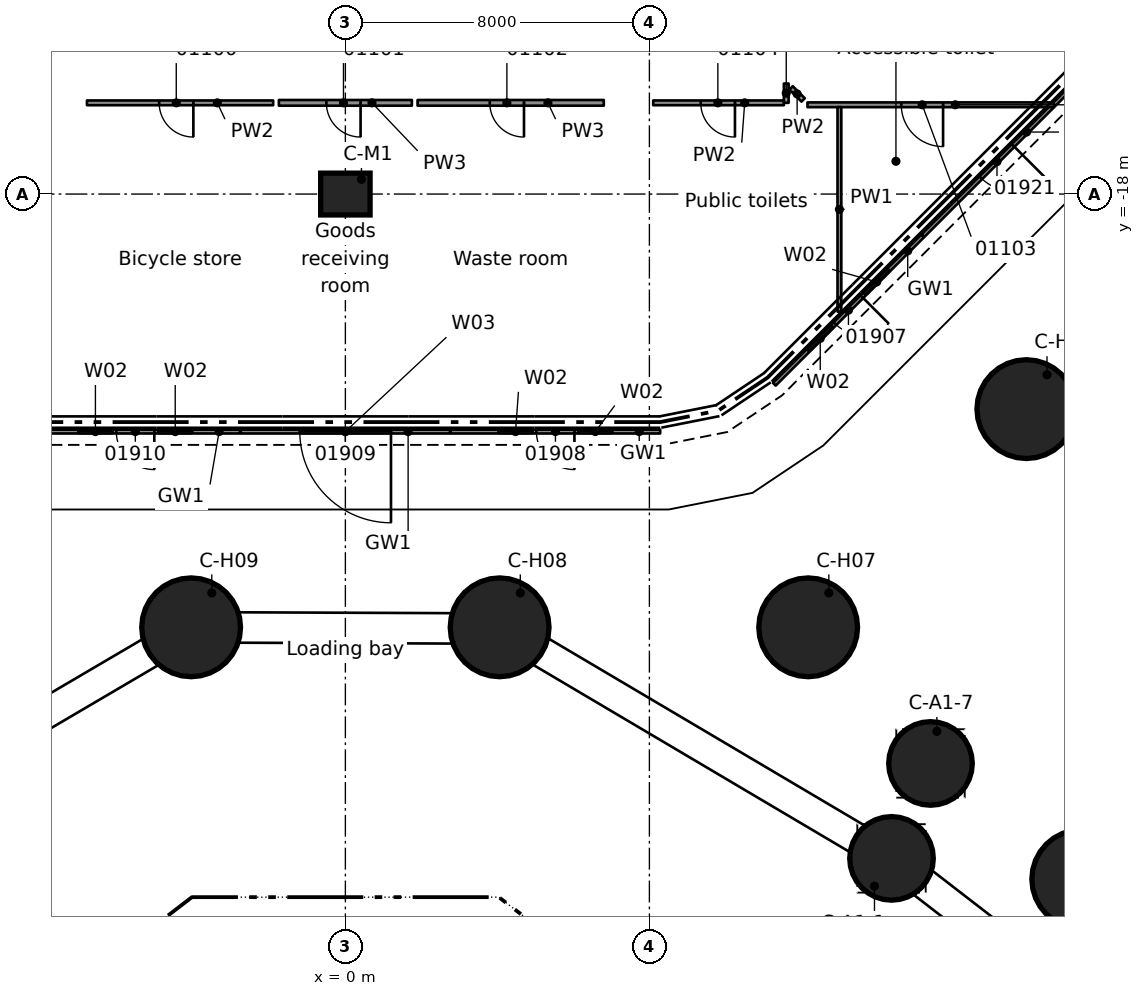
"""IFC4 building model, lengths in metres.
Left out: names, types, materials, properties, quantities, classifications, styles, units other than length and angle.
Written with IfcOpenShell. Run it as: python <this file> out.ifc"""

import sys

from ifc_helpers import new_model, si_unit, direction, frame, frame_2d, origin, origin_2d, place, context, subcontext, project, spatial, rectangle, circle, extrude, element, fill, save


model = new_model("IFC4")
c1 = context("Model", 3, precision=1e-05, world=origin(), true_north=direction((0.0, 1.0)))
c2 = subcontext(c1, "Body", "Model", "MODEL_VIEW")
j1 = project(units=[si_unit("LENGTHUNIT", "METRE"), si_unit("PLANEANGLEUNIT", "RADIAN")], contexts=[c1])
p1 = place(None, origin())
s1 = spatial("IfcSite", under=j1, at=p1, CompositionType="ELEMENT")
p2 = place(p1, origin())
s2 = spatial("IfcBuilding", under=s1, at=p2, CompositionType="ELEMENT")
p3 = place(p2, origin())
s3 = spatial("IfcBuildingStorey", under=s2, at=p3, CompositionType="ELEMENT", Elevation=0.0)
p4 = place(p3, frame((14.371, -35.48, 0.6), z_axis=(0.0, 0.0, 1.0), x_axis=(0.707106781187, 0.707106781187, 0.0)))
e1 = element("IfcColumn", 1, at=p4, inside=s3, PredefinedType="COLUMN", context=c2, shape_type="SweptSolid", body=[
    extrude(circle(Radius=1.1, at=origin_2d()), origin(), (0.0, 0.0, 1.0), 8.9),
])
p5 = place(p3, frame((19.364, -36.026, 0.6), z_axis=(0.0, 0.0, 1.0), x_axis=(1.0, 0.0, 0.0)))
e2 = element("IfcColumn", 2, at=p5, inside=s3, PredefinedType="COLUMN", context=c2, shape_type="SweptSolid", body=[
    extrude(circle(Radius=1.3, at=origin_2d()), origin(), (0.0, 0.0, 1.0), 8.9),
])
p6 = place(p3, frame((15.397, -32.982, 0.6), z_axis=(0.0, 0.0, 1.0), x_axis=(0.707106781187, 0.707106781187, 0.0)))
e3 = element("IfcColumn", 3, at=p6, inside=s3, PredefinedType="COLUMN", context=c2, shape_type="SweptSolid", body=[
    extrude(circle(Radius=1.1, at=origin_2d()), origin(), (0.0, 0.0, 1.0), 8.9),
])
for number, where, z_axis, x_axis in (
    (4, (17.919, -23.659, 0.6), (0.0, 0.0, 1.0), (1.0, 0.0, 0.0)),
    (5, (12.178, -29.4, 0.6), (0.0, 0.0, 1.0), (1.0, 0.0, 0.0)),
    (6, (4.059, -29.4, 0.6), (0.0, 0.0, 1.0), (1.0, 0.0, 0.0)),
    (7, (-4.059, -29.4, 0.6), (0.0, 0.0, 1.0), (1.0, 0.0, 0.0)),
):
    element("IfcColumn", number, at=place(p3, frame(where, z_axis=z_axis, x_axis=x_axis)), inside=s3, PredefinedType="COLUMN", context=c2, shape_type="SweptSolid", body=[
        extrude(circle(Radius=1.3, at=origin_2d()), origin(), (0.0, 0.0, 1.0), 8.9),
    ])
p7 = place(p3, frame((0.0, -18.0, -0.5), z_axis=(0.0, 0.0, 1.0), x_axis=(1.0, 0.0, 0.0)))
e8 = element("IfcColumn", 8, at=p7, inside=s3, PredefinedType="COLUMN", context=c2, shape_type="SweptSolid", body=[
    extrude(rectangle(XDim=1.3, YDim=1.1, at=origin_2d()), origin(), (0.0, 0.0, 1.0), 11.0),
])
p8 = place(p3, frame((19.093, -15.201, -0.4), z_axis=(0.0, 0.0, 1.0), x_axis=(-0.707106781187, -0.707106781187, 0.0)))
e9 = element("IfcWall", 9, at=p8, inside=s3, PredefinedType="STANDARD", context=c2, shape_type="SweptSolid", body=[
    extrude(rectangle(XDim=5.504, YDim=0.1, at=frame_2d((2.752, 0.0))), origin(), (0.0, 0.0, 1.0), 10.5),
])
p9 = place(p8, frame((2.152, 0.0, 0.4)))
e10 = element("IfcOpeningElement", 10, at=p9, cuts=e9, PredefinedType="OPENING", context=c2, shape_type="SweptSolid", body=[
    extrude(rectangle(XDim=1.2, YDim=2.2, at=frame_2d((0.6, 1.1))), frame((0.0, 0.06, 0.0), z_axis=(0.0, -1.0, 0.0), x_axis=(1.0, 0.0, 0.0)), (0.0, 0.0, 1.0), 0.12),
])
p10 = place(p3, frame((15.188, -19.106, -0.4), z_axis=(0.0, 0.0, 1.0), x_axis=(-0.707106781187, -0.707106781187, 0.0)))
e11 = element("IfcWall", 11, at=p10, inside=s3, PredefinedType="STANDARD", context=c2, shape_type="SweptSolid", body=[
    extrude(rectangle(XDim=5.514, YDim=0.1, at=frame_2d((2.757, 0.0))), origin(), (0.0, 0.0, 1.0), 10.5),
])
p11 = place(p10, frame((2.257, 0.0, 0.4)))
e12 = element("IfcOpeningElement", 12, at=p11, cuts=e11, PredefinedType="OPENING", context=c2, shape_type="SweptSolid", body=[
    extrude(rectangle(XDim=1.0, YDim=2.4, at=frame_2d((0.5, 1.2))), frame((0.0, 0.06, 0.0), z_axis=(0.0, -1.0, 0.0), x_axis=(1.0, 0.0, 0.0)), (0.0, 0.0, 1.0), 0.12),
])
p12 = place(p10, frame((1.257, 0.0, 0.4)))
e13 = element("IfcOpeningElement", 13, at=p12, cuts=e11, PredefinedType="OPENING", context=c2, shape_type="SweptSolid", body=[
    extrude(rectangle(XDim=0.9, YDim=2.4, at=frame_2d((0.45, 1.2))), frame((0.0, 0.06, 0.0), z_axis=(0.0, -1.0, 0.0), x_axis=(1.0, 0.0, 0.0)), (0.0, 0.0, 1.0), 0.12),
])
p13 = place(p10, frame((3.357, 0.0, 0.4)))
e14 = element("IfcOpeningElement", 14, at=p13, cuts=e11, PredefinedType="OPENING", context=c2, shape_type="SweptSolid", body=[
    extrude(rectangle(XDim=0.9, YDim=2.4, at=frame_2d((0.45, 1.2))), frame((0.0, 0.06, 0.0), z_axis=(0.0, -1.0, 0.0), x_axis=(1.0, 0.0, 0.0)), (0.0, 0.0, 1.0), 0.12),
])
p14 = place(p3, frame((8.284, -24.25, -0.4), z_axis=(0.0, 0.0, 1.0), x_axis=(-1.0, 0.0, 0.0)))
e15 = element("IfcWall", 15, at=p14, inside=s3, PredefinedType="STANDARD", context=c2, shape_type="SweptSolid", body=[
    extrude(rectangle(XDim=5.513, YDim=0.1, at=frame_2d((2.757, 0.0))), origin(), (0.0, 0.0, 1.0), 10.5),
])
p15 = place(p14, frame((2.257, 0.0, 0.4)))
e16 = element("IfcOpeningElement", 16, at=p15, cuts=e15, PredefinedType="OPENING", context=c2, shape_type="SweptSolid", body=[
    extrude(rectangle(XDim=1.0, YDim=2.4, at=frame_2d((0.5, 1.2))), frame((0.0, 0.06, 0.0), z_axis=(0.0, -1.0, 0.0), x_axis=(1.0, 0.0, 0.0)), (0.0, 0.0, 1.0), 0.12),
])
p16 = place(p14, frame((1.257, 0.0, 0.4)))
e17 = element("IfcOpeningElement", 17, at=p16, cuts=e15, PredefinedType="OPENING", context=c2, shape_type="SweptSolid", body=[
    extrude(rectangle(XDim=0.9, YDim=2.4, at=frame_2d((0.45, 1.2))), frame((0.0, 0.06, 0.0), z_axis=(0.0, -1.0, 0.0), x_axis=(1.0, 0.0, 0.0)), (0.0, 0.0, 1.0), 0.12),
])
p17 = place(p14, frame((3.357, 0.0, 0.4)))
e18 = element("IfcOpeningElement", 18, at=p17, cuts=e15, PredefinedType="OPENING", context=c2, shape_type="SweptSolid", body=[
    extrude(rectangle(XDim=0.9, YDim=2.4, at=frame_2d((0.45, 1.2))), frame((0.0, 0.06, 0.0), z_axis=(0.0, -1.0, 0.0), x_axis=(1.0, 0.0, 0.0)), (0.0, 0.0, 1.0), 0.12),
])
p18 = place(p3, frame((2.752, -24.25, -0.4), z_axis=(0.0, 0.0, 1.0), x_axis=(-1.0, 0.0, 0.0)))
e19 = element("IfcWall", 19, at=p18, inside=s3, PredefinedType="STANDARD", context=c2, shape_type="SweptSolid", body=[
    extrude(rectangle(XDim=5.504, YDim=0.1, at=frame_2d((2.752, 0.0))), origin(), (0.0, 0.0, 1.0), 10.5),
])
p19 = place(p18, frame((1.552, 0.0, 0.4)))
e20 = element("IfcOpeningElement", 20, at=p19, cuts=e19, PredefinedType="OPENING", context=c2, shape_type="SweptSolid", body=[
    extrude(rectangle(XDim=2.4, YDim=2.4, at=frame_2d((1.2, 1.2))), frame((0.0, 0.06, 0.0), z_axis=(0.0, -1.0, 0.0), x_axis=(1.0, 0.0, 0.0)), (0.0, 0.0, 1.0), 0.12),
])
p20 = place(p18, frame((1.552, 0.0, 3.0)))
e21 = element("IfcOpeningElement", 21, at=p20, cuts=e19, PredefinedType="OPENING", context=c2, shape_type="SweptSolid", body=[
    extrude(rectangle(XDim=2.4, YDim=1.5, at=frame_2d((1.2, 0.75))), frame((0.0, 0.06, 0.0), z_axis=(0.0, -1.0, 0.0), x_axis=(1.0, 0.0, 0.0)), (0.0, 0.0, 1.0), 0.12),
])
p21 = place(p3, frame((-2.771, -24.25, -0.4), z_axis=(0.0, 0.0, 1.0), x_axis=(-1.0, 0.0, 0.0)))
e22 = element("IfcWall", 22, at=p21, inside=s3, PredefinedType="STANDARD", context=c2, shape_type="SweptSolid", body=[
    extrude(rectangle(XDim=5.513, YDim=0.1, at=frame_2d((2.757, 0.0))), origin(), (0.0, 0.0, 1.0), 10.5),
])
p22 = place(p21, frame((2.257, 0.0, 0.4)))
e23 = element("IfcOpeningElement", 23, at=p22, cuts=e22, PredefinedType="OPENING", context=c2, shape_type="SweptSolid", body=[
    extrude(rectangle(XDim=1.0, YDim=2.4, at=frame_2d((0.5, 1.2))), frame((0.0, 0.06, 0.0), z_axis=(0.0, -1.0, 0.0), x_axis=(1.0, 0.0, 0.0)), (0.0, 0.0, 1.0), 0.12),
])
p23 = place(p21, frame((1.257, 0.0, 0.4)))
e24 = element("IfcOpeningElement", 24, at=p23, cuts=e22, PredefinedType="OPENING", context=c2, shape_type="SweptSolid", body=[
    extrude(rectangle(XDim=0.9, YDim=2.4, at=frame_2d((0.45, 1.2))), frame((0.0, 0.06, 0.0), z_axis=(0.0, -1.0, 0.0), x_axis=(1.0, 0.0, 0.0)), (0.0, 0.0, 1.0), 0.12),
])
p24 = place(p21, frame((3.357, 0.0, 0.4)))
e25 = element("IfcOpeningElement", 25, at=p24, cuts=e22, PredefinedType="OPENING", context=c2, shape_type="SweptSolid", body=[
    extrude(rectangle(XDim=0.9, YDim=2.4, at=frame_2d((0.45, 1.2))), frame((0.0, 0.06, 0.0), z_axis=(0.0, -1.0, 0.0), x_axis=(1.0, 0.0, 0.0)), (0.0, 0.0, 1.0), 0.12),
])
p25 = place(p3, frame((11.729, -15.207, 0.0), z_axis=(0.0, 0.0, 1.0), x_axis=(0.707106781187, -0.707106781187, 0.0)))
e26 = element("IfcWall", 26, at=p25, inside=s3, PredefinedType="PARTITIONING", context=c2, shape_type="SweptSolid", body=[
    extrude(rectangle(XDim=0.448, YDim=0.125, at=frame_2d((0.224, 0.0))), origin(), (0.0, 0.0, 1.0), 10.1),
])
p26 = place(p3, frame((18.642, -15.651, 0.0), z_axis=(0.0, 0.0, 1.0), x_axis=(-1.0, 0.0, 0.0)))
e27 = element("IfcWall", 27, at=p26, inside=s3, PredefinedType="PARTITIONING", context=c2, shape_type="SweptSolid", body=[
    extrude(rectangle(XDim=6.482, YDim=0.125, at=frame_2d((3.241, 0.0))), origin(), (0.0, 0.0, 1.0), 10.1),
])
p27 = place(p26, frame((2.914, 0.0, 0.0)))
e28 = element("IfcOpeningElement", 28, at=p27, cuts=e27, PredefinedType="OPENING", context=c2, shape_type="SweptSolid", body=[
    extrude(rectangle(XDim=1.1, YDim=2.1, at=frame_2d((0.55, 1.05))), frame((0.0, 0.073, 0.0), z_axis=(0.0, -1.0, 0.0), x_axis=(1.0, 0.0, 0.0)), (0.0, 0.0, 1.0), 0.145),
])
p28 = place(p3, frame((-1.9, -15.6, 0.0), z_axis=(0.0, 0.0, 1.0), x_axis=(-1.0, 0.0, 0.0)))
e29 = element("IfcWall", 29, at=p28, inside=s3, PredefinedType="PARTITIONING", context=c2, shape_type="SweptSolid", body=[
    extrude(rectangle(XDim=4.9, YDim=0.125, at=frame_2d((2.45, 0.0))), origin(), (0.0, 0.0, 1.0), 10.1),
])
p29 = place(p28, frame((2.1, 0.0, 0.0)))
e30 = element("IfcOpeningElement", 30, at=p29, cuts=e29, PredefinedType="OPENING", context=c2, shape_type="SweptSolid", body=[
    extrude(rectangle(XDim=0.9, YDim=2.1, at=frame_2d((0.45, 1.05))), frame((0.0, 0.073, 0.0), z_axis=(0.0, -1.0, 0.0), x_axis=(1.0, 0.0, 0.0)), (0.0, 0.0, 1.0), 0.145),
])
p30 = place(p3, frame((1.75, -15.6, 0.0), z_axis=(0.0, 0.0, 1.0), x_axis=(-1.0, 0.0, 0.0)))
e31 = element("IfcWall", 31, at=p30, inside=s3, PredefinedType="PARTITIONING", context=c2, shape_type="SweptSolid", body=[
    extrude(rectangle(XDim=3.5, YDim=0.15, at=frame_2d((1.75, 0.0))), origin(), (0.0, 0.0, 1.0), 10.1),
])
p31 = place(p30, frame((1.35, 0.0, 0.0)))
e32 = element("IfcOpeningElement", 32, at=p31, cuts=e31, PredefinedType="OPENING", context=c2, shape_type="SweptSolid", body=[
    extrude(rectangle(XDim=0.9, YDim=2.1, at=frame_2d((0.45, 1.05))), frame((0.0, 0.085, 0.0), z_axis=(0.0, -1.0, 0.0), x_axis=(1.0, 0.0, 0.0)), (0.0, 0.0, 1.0), 0.17),
])
p32 = place(p3, frame((6.8, -15.6, 0.0), z_axis=(0.0, 0.0, 1.0), x_axis=(-1.0, 0.0, 0.0)))
e33 = element("IfcWall", 33, at=p32, inside=s3, PredefinedType="PARTITIONING", context=c2, shape_type="SweptSolid", body=[
    extrude(rectangle(XDim=4.9, YDim=0.15, at=frame_2d((2.45, 0.0))), origin(), (0.0, 0.0, 1.0), 10.1),
])
p33 = place(p32, frame((2.1, 0.0, 0.0)))
e34 = element("IfcOpeningElement", 34, at=p33, cuts=e33, PredefinedType="OPENING", context=c2, shape_type="SweptSolid", body=[
    extrude(rectangle(XDim=0.9, YDim=2.1, at=frame_2d((0.45, 1.05))), frame((0.0, 0.085, 0.0), z_axis=(0.0, -1.0, 0.0), x_axis=(1.0, 0.0, 0.0)), (0.0, 0.0, 1.0), 0.17),
])
p34 = place(p3, frame((11.539, -15.6, 0.0), z_axis=(0.0, 0.0, 1.0), x_axis=(-1.0, 0.0, 0.0)))
e35 = element("IfcWall", 35, at=p34, inside=s3, PredefinedType="PARTITIONING", context=c2, shape_type="SweptSolid", body=[
    extrude(rectangle(XDim=3.439, YDim=0.125, at=frame_2d((1.719, 0.0))), origin(), (0.0, 0.0, 1.0), 10.1),
])
p35 = place(p34, frame((1.288, 0.0, 0.0)))
e36 = element("IfcOpeningElement", 36, at=p35, cuts=e35, PredefinedType="OPENING", context=c2, shape_type="SweptSolid", body=[
    extrude(rectangle(XDim=0.9, YDim=2.1, at=frame_2d((0.45, 1.05))), frame((0.0, 0.073, 0.0), z_axis=(0.0, -1.0, 0.0), x_axis=(1.0, 0.0, 0.0)), (0.0, 0.0, 1.0), 0.145),
])
p36 = place(p3, frame((13.0, -21.093, 0.0), z_axis=(0.0, 0.0, 1.0), x_axis=(0.0, 1.0, 0.0)))
e37 = element("IfcWall", 37, at=p36, inside=s3, PredefinedType="PARTITIONING", context=c2, shape_type="SweptSolid", body=[
    extrude(rectangle(XDim=5.38, YDim=0.1, at=frame_2d((2.69, 0.0))), origin(), (0.0, 0.0, 1.0), 10.1),
])
p37 = place(p3, frame((11.601, -15.6, 0.0), z_axis=(0.0, 0.0, 1.0), x_axis=(0.0, 1.0, 0.0)))
e38 = element("IfcWall", 38, at=p37, inside=s3, PredefinedType="PARTITIONING", context=c2, shape_type="SweptSolid", body=[
    extrude(rectangle(XDim=0.508, YDim=0.125, at=frame_2d((0.254, 0.0))), origin(), (0.0, 0.0, 1.0), 10.1),
])
p38 = place(p9, origin())
e39 = element("IfcDoor", 39, at=p38, inside=s3, OperationType="SINGLE_SWING_RIGHT", PredefinedType="DOOR", context=c2, shape_type="SweptSolid", body=[
    extrude(rectangle(XDim=1.2, YDim=2.2, at=frame_2d((0.6, 1.1))), frame((0.0, 0.025, 0.0), z_axis=(0.0, -1.0, 0.0), x_axis=(1.0, 0.0, 0.0)), (0.0, 0.0, 1.0), 0.05),
])
fill(e10, e39)
p39 = place(p11, origin())
e40 = element("IfcDoor", 40, at=p39, inside=s3, OperationType="SINGLE_SWING_LEFT", PredefinedType="DOOR", context=c2, shape_type="SweptSolid", body=[
    extrude(rectangle(XDim=1.0, YDim=2.4, at=frame_2d((0.5, 1.2))), frame((0.0, 0.025, 0.0), z_axis=(0.0, -1.0, 0.0), x_axis=(1.0, 0.0, 0.0)), (0.0, 0.0, 1.0), 0.05),
])
fill(e12, e40)
p40 = place(p12, origin())
e41 = element("IfcWindow", 41, at=p40, inside=s3, PartitioningType="SINGLE_PANEL", PredefinedType="WINDOW", context=c2, shape_type="SweptSolid", body=[
    extrude(rectangle(XDim=0.9, YDim=2.4, at=frame_2d((0.45, 1.2))), frame((0.0, 0.03, 0.0), z_axis=(0.0, -1.0, 0.0), x_axis=(1.0, 0.0, 0.0)), (0.0, 0.0, 1.0), 0.06),
])
fill(e13, e41)
p41 = place(p13, origin())
e42 = element("IfcWindow", 42, at=p41, inside=s3, PartitioningType="SINGLE_PANEL", PredefinedType="WINDOW", context=c2, shape_type="SweptSolid", body=[
    extrude(rectangle(XDim=0.9, YDim=2.4, at=frame_2d((0.45, 1.2))), frame((0.0, 0.03, 0.0), z_axis=(0.0, -1.0, 0.0), x_axis=(1.0, 0.0, 0.0)), (0.0, 0.0, 1.0), 0.06),
])
fill(e14, e42)
p42 = place(p15, origin())
e43 = element("IfcDoor", 43, at=p42, inside=s3, OperationType="SINGLE_SWING_RIGHT", PredefinedType="DOOR", context=c2, shape_type="SweptSolid", body=[
    extrude(rectangle(XDim=1.0, YDim=2.4, at=frame_2d((0.5, 1.2))), frame((0.0, 0.025, 0.0), z_axis=(0.0, -1.0, 0.0), x_axis=(1.0, 0.0, 0.0)), (0.0, 0.0, 1.0), 0.05),
])
fill(e16, e43)
p43 = place(p16, origin())
e44 = element("IfcWindow", 44, at=p43, inside=s3, PartitioningType="SINGLE_PANEL", PredefinedType="WINDOW", context=c2, shape_type="SweptSolid", body=[
    extrude(rectangle(XDim=0.9, YDim=2.4, at=frame_2d((0.45, 1.2))), frame((0.0, 0.03, 0.0), z_axis=(0.0, -1.0, 0.0), x_axis=(1.0, 0.0, 0.0)), (0.0, 0.0, 1.0), 0.06),
])
fill(e17, e44)
p44 = place(p17, origin())
e45 = element("IfcWindow", 45, at=p44, inside=s3, PartitioningType="SINGLE_PANEL", PredefinedType="WINDOW", context=c2, shape_type="SweptSolid", body=[
    extrude(rectangle(XDim=0.9, YDim=2.4, at=frame_2d((0.45, 1.2))), frame((0.0, 0.03, 0.0), z_axis=(0.0, -1.0, 0.0), x_axis=(1.0, 0.0, 0.0)), (0.0, 0.0, 1.0), 0.06),
])
fill(e18, e45)
p45 = place(p19, origin())
e46 = element("IfcDoor", 46, at=p45, inside=s3, OperationType="REVOLVING", PredefinedType="DOOR", context=c2, shape_type="SweptSolid", body=[
    extrude(rectangle(XDim=2.4, YDim=2.4, at=frame_2d((1.2, 1.2))), frame((0.0, 0.025, 0.0), z_axis=(0.0, -1.0, 0.0), x_axis=(1.0, 0.0, 0.0)), (0.0, 0.0, 1.0), 0.05),
])
fill(e20, e46)
p46 = place(p20, origin())
e47 = element("IfcWindow", 47, at=p46, inside=s3, PartitioningType="SINGLE_PANEL", PredefinedType="WINDOW", context=c2, shape_type="SweptSolid", body=[
    extrude(rectangle(XDim=2.4, YDim=1.5, at=frame_2d((1.2, 0.75))), frame((0.0, 0.03, 0.0), z_axis=(0.0, -1.0, 0.0), x_axis=(1.0, 0.0, 0.0)), (0.0, 0.0, 1.0), 0.06),
])
fill(e21, e47)
p47 = place(p22, origin())
e48 = element("IfcDoor", 48, at=p47, inside=s3, OperationType="SINGLE_SWING_RIGHT", PredefinedType="DOOR", context=c2, shape_type="SweptSolid", body=[
    extrude(rectangle(XDim=1.0, YDim=2.4, at=frame_2d((0.5, 1.2))), frame((0.0, 0.025, 0.0), z_axis=(0.0, -1.0, 0.0), x_axis=(1.0, 0.0, 0.0)), (0.0, 0.0, 1.0), 0.05),
])
fill(e23, e48)
p48 = place(p23, origin())
e49 = element("IfcWindow", 49, at=p48, inside=s3, PartitioningType="SINGLE_PANEL", PredefinedType="WINDOW", context=c2, shape_type="SweptSolid", body=[
    extrude(rectangle(XDim=0.9, YDim=2.4, at=frame_2d((0.45, 1.2))), frame((0.0, 0.03, 0.0), z_axis=(0.0, -1.0, 0.0), x_axis=(1.0, 0.0, 0.0)), (0.0, 0.0, 1.0), 0.06),
])
fill(e24, e49)
p49 = place(p24, origin())
e50 = element("IfcWindow", 50, at=p49, inside=s3, PartitioningType="SINGLE_PANEL", PredefinedType="WINDOW", context=c2, shape_type="SweptSolid", body=[
    extrude(rectangle(XDim=0.9, YDim=2.4, at=frame_2d((0.45, 1.2))), frame((0.0, 0.03, 0.0), z_axis=(0.0, -1.0, 0.0), x_axis=(1.0, 0.0, 0.0)), (0.0, 0.0, 1.0), 0.06),
])
fill(e25, e50)
p50 = place(p29, origin())
e51 = element("IfcDoor", 51, at=p50, inside=s3, OperationType="SINGLE_SWING_RIGHT", PredefinedType="DOOR", context=c2, shape_type="SweptSolid", body=[
    extrude(rectangle(XDim=0.9, YDim=2.1, at=frame_2d((0.45, 1.05))), frame((0.0, 0.025, 0.0), z_axis=(0.0, -1.0, 0.0), x_axis=(1.0, 0.0, 0.0)), (0.0, 0.0, 1.0), 0.05),
])
fill(e30, e51)
p51 = place(p31, origin())
e52 = element("IfcDoor", 52, at=p51, inside=s3, OperationType="SINGLE_SWING_RIGHT", PredefinedType="DOOR", context=c2, shape_type="SweptSolid", body=[
    extrude(rectangle(XDim=0.9, YDim=2.1, at=frame_2d((0.45, 1.05))), frame((0.0, 0.025, 0.0), z_axis=(0.0, -1.0, 0.0), x_axis=(1.0, 0.0, 0.0)), (0.0, 0.0, 1.0), 0.05),
])
fill(e32, e52)
p52 = place(p33, origin())
e53 = element("IfcDoor", 53, at=p52, inside=s3, OperationType="SINGLE_SWING_RIGHT", PredefinedType="DOOR", context=c2, shape_type="SweptSolid", body=[
    extrude(rectangle(XDim=0.9, YDim=2.1, at=frame_2d((0.45, 1.05))), frame((0.0, 0.025, 0.0), z_axis=(0.0, -1.0, 0.0), x_axis=(1.0, 0.0, 0.0)), (0.0, 0.0, 1.0), 0.05),
])
fill(e34, e53)
p53 = place(p27, origin())
e54 = element("IfcDoor", 54, at=p53, inside=s3, OperationType="SINGLE_SWING_RIGHT", PredefinedType="DOOR", context=c2, shape_type="SweptSolid", body=[
    extrude(rectangle(XDim=1.1, YDim=2.1, at=frame_2d((0.55, 1.05))), frame((0.0, 0.025, 0.0), z_axis=(0.0, -1.0, 0.0), x_axis=(1.0, 0.0, 0.0)), (0.0, 0.0, 1.0), 0.05),
])
fill(e28, e54)
p54 = place(p35, origin())
e55 = element("IfcDoor", 55, at=p54, inside=s3, OperationType="SINGLE_SWING_RIGHT", PredefinedType="DOOR", context=c2, shape_type="SweptSolid", body=[
    extrude(rectangle(XDim=0.9, YDim=2.1, at=frame_2d((0.45, 1.05))), frame((0.0, 0.025, 0.0), z_axis=(0.0, -1.0, 0.0), x_axis=(1.0, 0.0, 0.0)), (0.0, 0.0, 1.0), 0.05),
])
fill(e36, e55)
save(model, sys.argv[1])
